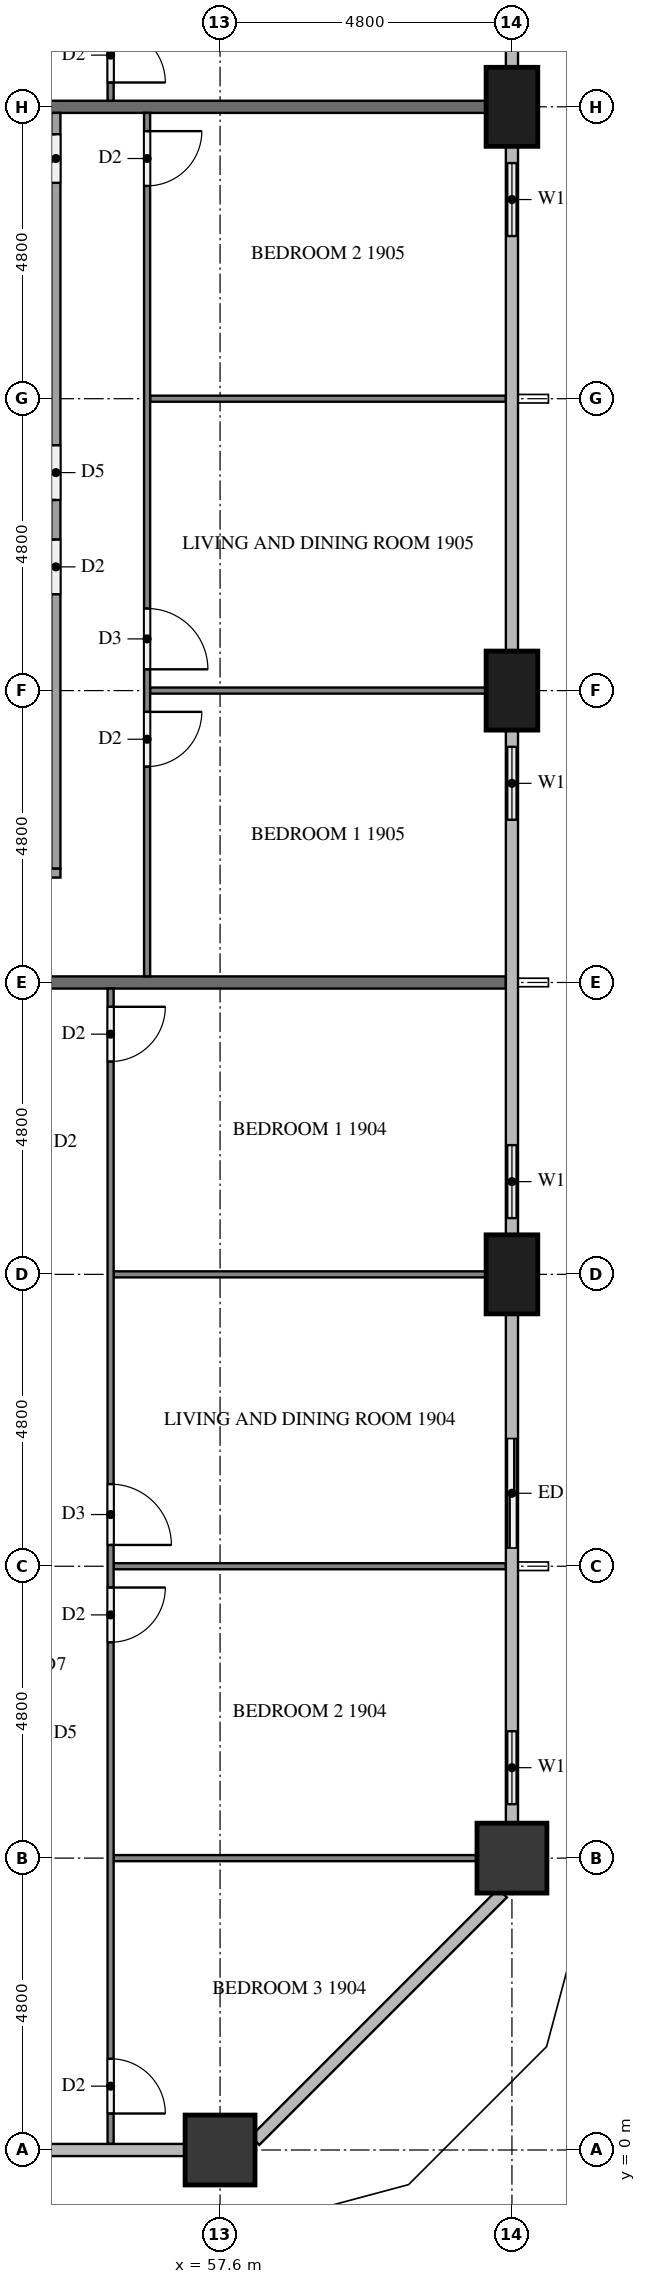
"""IFC4 building model, lengths in metres.
Left out: names, types, materials, properties, quantities, classifications, styles, units other than length and angle.
Written with IfcOpenShell. Run it as: python <this file> out.ifc"""

import sys

from ifc_helpers import new_model, si_unit, direction, frame, frame_2d, origin, origin_2d, place, context, subcontext, project, spatial, rectangle, extrude, element, fill, save


model = new_model("IFC4")
c1 = context("Model", 3, precision=1e-05, world=origin(), true_north=direction((0.0, 1.0)))
c2 = subcontext(c1, "Body", "Model", "MODEL_VIEW")
j1 = project(units=[si_unit("LENGTHUNIT", "METRE"), si_unit("PLANEANGLEUNIT", "RADIAN")], contexts=[c1])
p1 = place(None, origin())
s1 = spatial("IfcSite", under=j1, at=p1, CompositionType="ELEMENT")
p2 = place(p1, origin())
s2 = spatial("IfcBuilding", under=s1, at=p2, CompositionType="ELEMENT")
p3 = place(p2, frame((0.0, 0.0, 76.8)))
s3 = spatial("IfcBuildingStorey", under=s2, at=p3, CompositionType="ELEMENT", Elevation=76.8)
for number, where, z_axis, x_axis in (
    (1, (57.6, 0.0, 0.0), (0.0, 0.0, 1.0), (1.0, 0.0, 0.0)),
    (2, (62.4, 4.8, 0.0), (0.0, 0.0, 1.0), (1.0, 0.0, 0.0)),
):
    element("IfcColumn", number, at=place(p3, frame(where, z_axis=z_axis, x_axis=x_axis)), inside=s3, PredefinedType="COLUMN", context=c2, shape_type="SweptSolid", body=[
        extrude(rectangle(XDim=1.15, YDim=1.15, at=origin_2d()), origin(), (0.0, 0.0, 1.0), 3.2),
    ])
for number, where, z_axis, x_axis in (
    (3, (62.4, 14.4, 0.0), (0.0, 0.0, 1.0), (0.0, 1.0, 0.0)),
    (4, (62.4, 24.0, 0.0), (0.0, 0.0, 1.0), (0.0, 1.0, 0.0)),
    (5, (62.4, 33.6, 0.0), (0.0, 0.0, 1.0), (0.0, 1.0, 0.0)),
):
    element("IfcColumn", number, at=place(p3, frame(where, z_axis=z_axis, x_axis=x_axis)), inside=s3, PredefinedType="COLUMN", context=c2, shape_type="SweptSolid", body=[
        extrude(rectangle(XDim=1.3, YDim=0.85, at=origin_2d()), origin(), (0.0, 0.0, 1.0), 3.2),
    ])
p4 = place(p3, frame((62.4, 5.375, 0.0), z_axis=(0.0, 0.0, 1.0), x_axis=(0.0, 1.0, 0.0)))
e6 = element("IfcWall", 6, at=p4, inside=s3, PredefinedType="SOLIDWALL", context=c2, shape_type="SweptSolid", body=[
    extrude(rectangle(XDim=1.825, YDim=0.15, at=frame_2d((0.913, 0.0))), origin(), (0.0, 0.0, 1.0), 3.2),
])
p5 = place(p4, frame((0.312, 0.0, 0.9)))
e7 = element("IfcOpeningElement", 7, at=p5, cuts=e6, PredefinedType="OPENING", context=c2, shape_type="SweptSolid", body=[
    extrude(rectangle(XDim=1.2, YDim=1.4, at=frame_2d((0.6, 0.7))), frame((0.0, 0.085, 0.0), z_axis=(0.0, -1.0, 0.0), x_axis=(1.0, 0.0, 0.0)), (0.0, 0.0, 1.0), 0.17),
])
p6 = place(p3, frame((62.4, 9.6, 0.0), z_axis=(0.0, 0.0, 1.0), x_axis=(0.0, 1.0, 0.0)))
e8 = element("IfcWall", 8, at=p6, inside=s3, PredefinedType="SOLIDWALL", context=c2, shape_type="SweptSolid", body=[
    extrude(rectangle(XDim=2.4, YDim=0.15, at=frame_2d((1.2, 0.0))), origin(), (0.0, 0.0, 1.0), 3.2),
])
p7 = place(p6, frame((0.3, 0.0, 0.0)))
e9 = element("IfcOpeningElement", 9, at=p7, cuts=e8, PredefinedType="OPENING", context=c2, shape_type="SweptSolid", body=[
    extrude(rectangle(XDim=1.8, YDim=2.4, at=frame_2d((0.9, 1.2))), frame((0.0, 0.085, 0.0), z_axis=(0.0, -1.0, 0.0), x_axis=(1.0, 0.0, 0.0)), (0.0, 0.0, 1.0), 0.17),
])
p8 = place(p3, frame((62.4, 15.05, 0.0), z_axis=(0.0, 0.0, 1.0), x_axis=(0.0, 1.0, 0.0)))
e10 = element("IfcWall", 10, at=p8, inside=s3, PredefinedType="SOLIDWALL", context=c2, shape_type="SweptSolid", body=[
    extrude(rectangle(XDim=1.75, YDim=0.15, at=frame_2d((0.875, 0.0))), origin(), (0.0, 0.0, 1.0), 3.2),
])
p9 = place(p8, frame((0.275, 0.0, 0.9)))
e11 = element("IfcOpeningElement", 11, at=p9, cuts=e10, PredefinedType="OPENING", context=c2, shape_type="SweptSolid", body=[
    extrude(rectangle(XDim=1.2, YDim=1.4, at=frame_2d((0.6, 0.7))), frame((0.0, 0.085, 0.0), z_axis=(0.0, -1.0, 0.0), x_axis=(1.0, 0.0, 0.0)), (0.0, 0.0, 1.0), 0.17),
])
p10 = place(p3, frame((62.4, 21.6, 0.0), z_axis=(0.0, 0.0, 1.0), x_axis=(0.0, 1.0, 0.0)))
e12 = element("IfcWall", 12, at=p10, inside=s3, PredefinedType="SOLIDWALL", context=c2, shape_type="SweptSolid", body=[
    extrude(rectangle(XDim=1.75, YDim=0.15, at=frame_2d((0.875, 0.0))), origin(), (0.0, 0.0, 1.0), 3.2),
])
p11 = place(p10, frame((0.275, 0.0, 0.9)))
e13 = element("IfcOpeningElement", 13, at=p11, cuts=e12, PredefinedType="OPENING", context=c2, shape_type="SweptSolid", body=[
    extrude(rectangle(XDim=1.2, YDim=1.4, at=frame_2d((0.6, 0.7))), frame((0.0, 0.085, 0.0), z_axis=(0.0, -1.0, 0.0), x_axis=(1.0, 0.0, 0.0)), (0.0, 0.0, 1.0), 0.17),
])
p12 = place(p3, frame((62.4, 31.2, 0.0), z_axis=(0.0, 0.0, 1.0), x_axis=(0.0, 1.0, 0.0)))
e14 = element("IfcWall", 14, at=p12, inside=s3, PredefinedType="SOLIDWALL", context=c2, shape_type="SweptSolid", body=[
    extrude(rectangle(XDim=1.75, YDim=0.15, at=frame_2d((0.875, 0.0))), origin(), (0.0, 0.0, 1.0), 3.2),
])
p13 = place(p12, frame((0.275, 0.0, 0.9)))
e15 = element("IfcOpeningElement", 15, at=p13, cuts=e14, PredefinedType="OPENING", context=c2, shape_type="SweptSolid", body=[
    extrude(rectangle(XDim=1.2, YDim=1.4, at=frame_2d((0.6, 0.7))), frame((0.0, 0.085, 0.0), z_axis=(0.0, -1.0, 0.0), x_axis=(1.0, 0.0, 0.0)), (0.0, 0.0, 1.0), 0.17),
])
p14 = place(p3, frame((62.4, 34.25, 0.0), z_axis=(0.0, 0.0, 1.0), x_axis=(0.0, 1.0, 0.0)))
e16 = element("IfcWall", 16, at=p14, inside=s3, PredefinedType="SOLIDWALL", context=c2, shape_type="SweptSolid", body=[
    extrude(rectangle(XDim=1.75, YDim=0.15, at=frame_2d((0.875, 0.0))), origin(), (0.0, 0.0, 1.0), 3.2),
])
p15 = place(p14, frame((0.275, 0.0, 0.9)))
e17 = element("IfcOpeningElement", 17, at=p15, cuts=e16, PredefinedType="OPENING", context=c2, shape_type="SweptSolid", body=[
    extrude(rectangle(XDim=1.2, YDim=1.4, at=frame_2d((0.6, 0.7))), frame((0.0, 0.085, 0.0), z_axis=(0.0, -1.0, 0.0), x_axis=(1.0, 0.0, 0.0)), (0.0, 0.0, 1.0), 0.17),
])
p16 = place(p3, frame((50.5, 19.2, 0.0), z_axis=(0.0, 0.0, 1.0), x_axis=(1.0, 0.0, 0.0)))
e18 = element("IfcWall", 18, at=p16, inside=s3, PredefinedType="PARTITIONING", context=c2, shape_type="SweptSolid", body=[
    extrude(rectangle(XDim=11.8, YDim=0.2, at=frame_2d((5.9, 0.0))), origin(), (0.0, 0.0, 1.0), 3.2),
])
p17 = place(p3, frame((50.5, 33.6, 0.0), z_axis=(0.0, 0.0, 1.0), x_axis=(1.0, 0.0, 0.0)))
e19 = element("IfcWall", 19, at=p17, inside=s3, PredefinedType="PARTITIONING", context=c2, shape_type="SweptSolid", body=[
    extrude(rectangle(XDim=11.475, YDim=0.2, at=frame_2d((5.738, 0.0))), origin(), (0.0, 0.0, 1.0), 3.2),
])
p18 = place(p3, frame((55.85, 14.4, 0.0), z_axis=(0.0, 0.0, 1.0), x_axis=(1.0, 0.0, 0.0)))
e20 = element("IfcWall", 20, at=p18, inside=s3, PredefinedType="PARTITIONING", context=c2, shape_type="SweptSolid", body=[
    extrude(rectangle(XDim=6.125, YDim=0.1, at=frame_2d((3.062, 0.0))), origin(), (0.0, 0.0, 1.0), 3.2),
])
p19 = place(p3, frame((55.85, 9.6, 0.0), z_axis=(0.0, 0.0, 1.0), x_axis=(1.0, 0.0, 0.0)))
e21 = element("IfcWall", 21, at=p19, inside=s3, PredefinedType="PARTITIONING", context=c2, shape_type="SweptSolid", body=[
    extrude(rectangle(XDim=6.45, YDim=0.1, at=frame_2d((3.225, 0.0))), origin(), (0.0, 0.0, 1.0), 3.2),
])
p20 = place(p3, frame((55.85, 4.8, 0.0), z_axis=(0.0, 0.0, 1.0), x_axis=(1.0, 0.0, 0.0)))
e22 = element("IfcWall", 22, at=p20, inside=s3, PredefinedType="PARTITIONING", context=c2, shape_type="SweptSolid", body=[
    extrude(rectangle(XDim=5.975, YDim=0.1, at=frame_2d((2.987, 0.0))), origin(), (0.0, 0.0, 1.0), 3.2),
])
p21 = place(p3, frame((55.8, 19.1, 0.0), z_axis=(0.0, 0.0, 1.0), x_axis=(0.0, -1.0, 0.0)))
e23 = element("IfcWall", 23, at=p21, inside=s3, PredefinedType="PARTITIONING", context=c2, shape_type="SweptSolid", body=[
    extrude(rectangle(XDim=19.0, YDim=0.1, at=frame_2d((9.5, 0.0))), origin(), (0.0, 0.0, 1.0), 3.2),
])
p22 = place(p21, frame((0.3, 0.0, 0.0)))
e24 = element("IfcOpeningElement", 24, at=p22, cuts=e23, PredefinedType="OPENING", context=c2, shape_type="SweptSolid", body=[
    extrude(rectangle(XDim=0.9, YDim=2.1, at=frame_2d((0.45, 1.05))), frame((0.0, 0.06, 0.0), z_axis=(0.0, -1.0, 0.0), x_axis=(1.0, 0.0, 0.0)), (0.0, 0.0, 1.0), 0.12),
])
p23 = place(p21, frame((8.15, 0.0, 0.0)))
e25 = element("IfcOpeningElement", 25, at=p23, cuts=e23, PredefinedType="OPENING", context=c2, shape_type="SweptSolid", body=[
    extrude(rectangle(XDim=1.0, YDim=2.1, at=frame_2d((0.5, 1.05))), frame((0.0, 0.06, 0.0), z_axis=(0.0, -1.0, 0.0), x_axis=(1.0, 0.0, 0.0)), (0.0, 0.0, 1.0), 0.12),
])
p24 = place(p21, frame((9.85, 0.0, 0.0)))
e26 = element("IfcOpeningElement", 26, at=p24, cuts=e23, PredefinedType="OPENING", context=c2, shape_type="SweptSolid", body=[
    extrude(rectangle(XDim=0.9, YDim=2.1, at=frame_2d((0.45, 1.05))), frame((0.0, 0.06, 0.0), z_axis=(0.0, -1.0, 0.0), x_axis=(1.0, 0.0, 0.0)), (0.0, 0.0, 1.0), 0.12),
])
p25 = place(p21, frame((17.6, 0.0, 0.0)))
e27 = element("IfcOpeningElement", 27, at=p25, cuts=e23, PredefinedType="OPENING", context=c2, shape_type="SweptSolid", body=[
    extrude(rectangle(XDim=0.9, YDim=2.1, at=frame_2d((0.45, 1.05))), frame((0.0, 0.06, 0.0), z_axis=(0.0, -1.0, 0.0), x_axis=(1.0, 0.0, 0.0)), (0.0, 0.0, 1.0), 0.12),
])
p26 = place(p3, frame((56.45, 24.0, 0.0), z_axis=(0.0, 0.0, 1.0), x_axis=(1.0, 0.0, 0.0)))
e28 = element("IfcWall", 28, at=p26, inside=s3, PredefinedType="PARTITIONING", context=c2, shape_type="SweptSolid", body=[
    extrude(rectangle(XDim=5.525, YDim=0.1, at=frame_2d((2.763, 0.0))), origin(), (0.0, 0.0, 1.0), 3.2),
])
p27 = place(p3, frame((56.45, 28.8, 0.0), z_axis=(0.0, 0.0, 1.0), x_axis=(1.0, 0.0, 0.0)))
e29 = element("IfcWall", 29, at=p27, inside=s3, PredefinedType="PARTITIONING", context=c2, shape_type="SweptSolid", body=[
    extrude(rectangle(XDim=5.85, YDim=0.1, at=frame_2d((2.925, 0.0))), origin(), (0.0, 0.0, 1.0), 3.2),
])
p28 = place(p3, frame((56.4, 33.5, 0.0), z_axis=(0.0, 0.0, 1.0), x_axis=(0.0, -1.0, 0.0)))
e30 = element("IfcWall", 30, at=p28, inside=s3, PredefinedType="PARTITIONING", context=c2, shape_type="SweptSolid", body=[
    extrude(rectangle(XDim=14.2, YDim=0.1, at=frame_2d((7.1, 0.0))), origin(), (0.0, 0.0, 1.0), 3.2),
])
p29 = place(p28, frame((9.85, 0.0, 0.0)))
e31 = element("IfcOpeningElement", 31, at=p29, cuts=e30, PredefinedType="OPENING", context=c2, shape_type="SweptSolid", body=[
    extrude(rectangle(XDim=0.9, YDim=2.1, at=frame_2d((0.45, 1.05))), frame((0.0, 0.06, 0.0), z_axis=(0.0, -1.0, 0.0), x_axis=(1.0, 0.0, 0.0)), (0.0, 0.0, 1.0), 0.12),
])
p30 = place(p28, frame((8.15, 0.0, 0.0)))
e32 = element("IfcOpeningElement", 32, at=p30, cuts=e30, PredefinedType="OPENING", context=c2, shape_type="SweptSolid", body=[
    extrude(rectangle(XDim=1.0, YDim=2.1, at=frame_2d((0.5, 1.05))), frame((0.0, 0.06, 0.0), z_axis=(0.0, -1.0, 0.0), x_axis=(1.0, 0.0, 0.0)), (0.0, 0.0, 1.0), 0.12),
])
p31 = place(p28, frame((0.3, 0.0, 0.0)))
e33 = element("IfcOpeningElement", 33, at=p31, cuts=e30, PredefinedType="OPENING", context=c2, shape_type="SweptSolid", body=[
    extrude(rectangle(XDim=0.9, YDim=2.1, at=frame_2d((0.45, 1.05))), frame((0.0, 0.06, 0.0), z_axis=(0.0, -1.0, 0.0), x_axis=(1.0, 0.0, 0.0)), (0.0, 0.0, 1.0), 0.12),
])
p32 = place(p3, frame((50.5, 21.0, 0.0), z_axis=(0.0, 0.0, 1.0), x_axis=(1.0, 0.0, 0.0)))
e34 = element("IfcWall", 34, at=p32, inside=s3, PredefinedType="PARTITIONING", context=c2, shape_type="SweptSolid", body=[
    extrude(rectangle(XDim=4.475, YDim=0.15, at=frame_2d((2.238, 0.0))), origin(), (0.0, 0.0, 1.0), 3.2),
])
p33 = place(p3, frame((54.9, 21.075, 0.0), z_axis=(0.0, 0.0, 1.0), x_axis=(0.0, 1.0, 0.0)))
e35 = element("IfcWall", 35, at=p33, inside=s3, PredefinedType="PARTITIONING", context=c2, shape_type="SweptSolid", body=[
    extrude(rectangle(XDim=12.425, YDim=0.15, at=frame_2d((6.212, 0.0))), origin(), (0.0, 0.0, 1.0), 3.2),
])
p34 = place(p33, frame((4.51, 0.0, 0.0)))
e36 = element("IfcOpeningElement", 36, at=p34, cuts=e35, PredefinedType="OPENING", context=c2, shape_type="SweptSolid", body=[
    extrude(rectangle(XDim=0.9, YDim=2.1, at=frame_2d((0.45, 1.05))), frame((0.0, 0.085, 0.0), z_axis=(0.0, -1.0, 0.0), x_axis=(1.0, 0.0, 0.0)), (0.0, 0.0, 1.0), 0.17),
])
p35 = place(p33, frame((6.06, 0.0, 0.0)))
e37 = element("IfcOpeningElement", 37, at=p35, cuts=e35, PredefinedType="OPENING", context=c2, shape_type="SweptSolid", body=[
    extrude(rectangle(XDim=0.9, YDim=2.1, at=frame_2d((0.45, 1.05))), frame((0.0, 0.085, 0.0), z_axis=(0.0, -1.0, 0.0), x_axis=(1.0, 0.0, 0.0)), (0.0, 0.0, 1.0), 0.17),
])
p36 = place(p33, frame((11.275, 0.0, 0.0)))
e38 = element("IfcOpeningElement", 38, at=p36, cuts=e35, PredefinedType="OPENING", context=c2, shape_type="SweptSolid", body=[
    extrude(rectangle(XDim=0.8, YDim=2.1, at=frame_2d((0.4, 1.05))), frame((0.0, 0.085, 0.0), z_axis=(0.0, -1.0, 0.0), x_axis=(1.0, 0.0, 0.0)), (0.0, 0.0, 1.0), 0.17),
])
p37 = place(p3, frame((55.8, 47.9, 0.0), z_axis=(0.0, 0.0, 1.0), x_axis=(0.0, -1.0, 0.0)))
e39 = element("IfcWall", 39, at=p37, inside=s3, PredefinedType="PARTITIONING", context=c2, shape_type="SweptSolid", body=[
    extrude(rectangle(XDim=14.2, YDim=0.1, at=frame_2d((7.1, 0.0))), origin(), (0.0, 0.0, 1.0), 3.2),
])
p38 = place(p37, frame((13.0, 0.0, 0.0)))
e40 = element("IfcOpeningElement", 40, at=p38, cuts=e39, PredefinedType="OPENING", context=c2, shape_type="SweptSolid", body=[
    extrude(rectangle(XDim=0.9, YDim=2.1, at=frame_2d((0.45, 1.05))), frame((0.0, 0.06, 0.0), z_axis=(0.0, -1.0, 0.0), x_axis=(1.0, 0.0, 0.0)), (0.0, 0.0, 1.0), 0.12),
])
p39 = place(p37, frame((5.05, 0.0, 0.0)))
e41 = element("IfcOpeningElement", 41, at=p39, cuts=e39, PredefinedType="OPENING", context=c2, shape_type="SweptSolid", body=[
    extrude(rectangle(XDim=0.9, YDim=2.1, at=frame_2d((0.45, 1.05))), frame((0.0, 0.06, 0.0), z_axis=(0.0, -1.0, 0.0), x_axis=(1.0, 0.0, 0.0)), (0.0, 0.0, 1.0), 0.12),
])
p40 = place(p37, frame((3.35, 0.0, 0.0)))
e42 = element("IfcOpeningElement", 42, at=p40, cuts=e39, PredefinedType="OPENING", context=c2, shape_type="SweptSolid", body=[
    extrude(rectangle(XDim=1.0, YDim=2.1, at=frame_2d((0.5, 1.05))), frame((0.0, 0.06, 0.0), z_axis=(0.0, -1.0, 0.0), x_axis=(1.0, 0.0, 0.0)), (0.0, 0.0, 1.0), 0.12),
])
p41 = place(p5, origin())
e43 = element("IfcWindow", 43, at=p41, inside=s3, PartitioningType="SINGLE_PANEL", PredefinedType="WINDOW", context=c2, shape_type="SweptSolid", body=[
    extrude(rectangle(XDim=1.2, YDim=1.4, at=frame_2d((0.6, 0.7))), frame((0.0, 0.03, 0.0), z_axis=(0.0, -1.0, 0.0), x_axis=(1.0, 0.0, 0.0)), (0.0, 0.0, 1.0), 0.06),
])
fill(e7, e43)
p42 = place(p7, origin())
e44 = element("IfcDoor", 44, at=p42, inside=s3, OperationType="SLIDING_TO_LEFT", PredefinedType="DOOR", context=c2, shape_type="SweptSolid", body=[
    extrude(rectangle(XDim=1.8, YDim=2.4, at=frame_2d((0.9, 1.2))), frame((0.0, 0.025, 0.0), z_axis=(0.0, -1.0, 0.0), x_axis=(1.0, 0.0, 0.0)), (0.0, 0.0, 1.0), 0.05),
])
fill(e9, e44)
p43 = place(p9, origin())
e45 = element("IfcWindow", 45, at=p43, inside=s3, PartitioningType="SINGLE_PANEL", PredefinedType="WINDOW", context=c2, shape_type="SweptSolid", body=[
    extrude(rectangle(XDim=1.2, YDim=1.4, at=frame_2d((0.6, 0.7))), frame((0.0, 0.03, 0.0), z_axis=(0.0, -1.0, 0.0), x_axis=(1.0, 0.0, 0.0)), (0.0, 0.0, 1.0), 0.06),
])
fill(e11, e45)
p44 = place(p11, origin())
e46 = element("IfcWindow", 46, at=p44, inside=s3, PartitioningType="SINGLE_PANEL", PredefinedType="WINDOW", context=c2, shape_type="SweptSolid", body=[
    extrude(rectangle(XDim=1.2, YDim=1.4, at=frame_2d((0.6, 0.7))), frame((0.0, 0.03, 0.0), z_axis=(0.0, -1.0, 0.0), x_axis=(1.0, 0.0, 0.0)), (0.0, 0.0, 1.0), 0.06),
])
fill(e13, e46)
p45 = place(p13, origin())
e47 = element("IfcWindow", 47, at=p45, inside=s3, PartitioningType="SINGLE_PANEL", PredefinedType="WINDOW", context=c2, shape_type="SweptSolid", body=[
    extrude(rectangle(XDim=1.2, YDim=1.4, at=frame_2d((0.6, 0.7))), frame((0.0, 0.03, 0.0), z_axis=(0.0, -1.0, 0.0), x_axis=(1.0, 0.0, 0.0)), (0.0, 0.0, 1.0), 0.06),
])
fill(e15, e47)
p46 = place(p22, origin())
e48 = element("IfcDoor", 48, at=p46, inside=s3, OperationType="SINGLE_SWING_LEFT", PredefinedType="DOOR", context=c2, shape_type="SweptSolid", body=[
    extrude(rectangle(XDim=0.9, YDim=2.1, at=frame_2d((0.45, 1.05))), frame((0.0, 0.025, 0.0), z_axis=(0.0, -1.0, 0.0), x_axis=(1.0, 0.0, 0.0)), (0.0, 0.0, 1.0), 0.05),
])
fill(e24, e48)
p47 = place(p23, origin())
e49 = element("IfcDoor", 49, at=p47, inside=s3, OperationType="SINGLE_SWING_RIGHT", PredefinedType="DOOR", context=c2, shape_type="SweptSolid", body=[
    extrude(rectangle(XDim=1.0, YDim=2.1, at=frame_2d((0.5, 1.05))), frame((0.0, 0.025, 0.0), z_axis=(0.0, -1.0, 0.0), x_axis=(1.0, 0.0, 0.0)), (0.0, 0.0, 1.0), 0.05),
])
fill(e25, e49)
p48 = place(p24, origin())
e50 = element("IfcDoor", 50, at=p48, inside=s3, OperationType="SINGLE_SWING_LEFT", PredefinedType="DOOR", context=c2, shape_type="SweptSolid", body=[
    extrude(rectangle(XDim=0.9, YDim=2.1, at=frame_2d((0.45, 1.05))), frame((0.0, 0.025, 0.0), z_axis=(0.0, -1.0, 0.0), x_axis=(1.0, 0.0, 0.0)), (0.0, 0.0, 1.0), 0.05),
])
fill(e26, e50)
p49 = place(p25, origin())
e51 = element("IfcDoor", 51, at=p49, inside=s3, OperationType="SINGLE_SWING_RIGHT", PredefinedType="DOOR", context=c2, shape_type="SweptSolid", body=[
    extrude(rectangle(XDim=0.9, YDim=2.1, at=frame_2d((0.45, 1.05))), frame((0.0, 0.025, 0.0), z_axis=(0.0, -1.0, 0.0), x_axis=(1.0, 0.0, 0.0)), (0.0, 0.0, 1.0), 0.05),
])
fill(e27, e51)
p50 = place(p29, origin())
e52 = element("IfcDoor", 52, at=p50, inside=s3, OperationType="SINGLE_SWING_LEFT", PredefinedType="DOOR", context=c2, shape_type="SweptSolid", body=[
    extrude(rectangle(XDim=0.9, YDim=2.1, at=frame_2d((0.45, 1.05))), frame((0.0, 0.025, 0.0), z_axis=(0.0, -1.0, 0.0), x_axis=(1.0, 0.0, 0.0)), (0.0, 0.0, 1.0), 0.05),
])
fill(e31, e52)
p51 = place(p30, origin())
e53 = element("IfcDoor", 53, at=p51, inside=s3, OperationType="SINGLE_SWING_RIGHT", PredefinedType="DOOR", context=c2, shape_type="SweptSolid", body=[
    extrude(rectangle(XDim=1.0, YDim=2.1, at=frame_2d((0.5, 1.05))), frame((0.0, 0.025, 0.0), z_axis=(0.0, -1.0, 0.0), x_axis=(1.0, 0.0, 0.0)), (0.0, 0.0, 1.0), 0.05),
])
fill(e32, e53)
p52 = place(p31, origin())
e54 = element("IfcDoor", 54, at=p52, inside=s3, OperationType="SINGLE_SWING_LEFT", PredefinedType="DOOR", context=c2, shape_type="SweptSolid", body=[
    extrude(rectangle(XDim=0.9, YDim=2.1, at=frame_2d((0.45, 1.05))), frame((0.0, 0.025, 0.0), z_axis=(0.0, -1.0, 0.0), x_axis=(1.0, 0.0, 0.0)), (0.0, 0.0, 1.0), 0.05),
])
fill(e33, e54)
p53 = place(p34, origin())
e55 = element("IfcDoor", 55, at=p53, inside=s3, OperationType="SINGLE_SWING_RIGHT", PredefinedType="DOOR", context=c2, shape_type="SweptSolid", body=[
    extrude(rectangle(XDim=0.9, YDim=2.1, at=frame_2d((0.45, 1.05))), frame((0.0, 0.025, 0.0), z_axis=(0.0, -1.0, 0.0), x_axis=(1.0, 0.0, 0.0)), (0.0, 0.0, 1.0), 0.05),
])
fill(e36, e55)
p54 = place(p35, origin())
e56 = element("IfcDoor", 56, at=p54, inside=s3, OperationType="SINGLE_SWING_LEFT", PredefinedType="DOOR", context=c2, shape_type="SweptSolid", body=[
    extrude(rectangle(XDim=0.9, YDim=2.1, at=frame_2d((0.45, 1.05))), frame((0.0, 0.025, 0.0), z_axis=(0.0, -1.0, 0.0), x_axis=(1.0, 0.0, 0.0)), (0.0, 0.0, 1.0), 0.05),
])
fill(e37, e56)
p55 = place(p36, origin())
e57 = element("IfcDoor", 57, at=p55, inside=s3, OperationType="SINGLE_SWING_RIGHT", PredefinedType="DOOR", context=c2, shape_type="SweptSolid", body=[
    extrude(rectangle(XDim=0.8, YDim=2.1, at=frame_2d((0.4, 1.05))), frame((0.0, 0.025, 0.0), z_axis=(0.0, -1.0, 0.0), x_axis=(1.0, 0.0, 0.0)), (0.0, 0.0, 1.0), 0.05),
])
fill(e38, e57)
p56 = place(p38, origin())
e58 = element("IfcDoor", 58, at=p56, inside=s3, OperationType="SINGLE_SWING_RIGHT", PredefinedType="DOOR", context=c2, shape_type="SweptSolid", body=[
    extrude(rectangle(XDim=0.9, YDim=2.1, at=frame_2d((0.45, 1.05))), frame((0.0, 0.025, 0.0), z_axis=(0.0, -1.0, 0.0), x_axis=(1.0, 0.0, 0.0)), (0.0, 0.0, 1.0), 0.05),
])
fill(e40, e58)
save(model, sys.argv[1])
